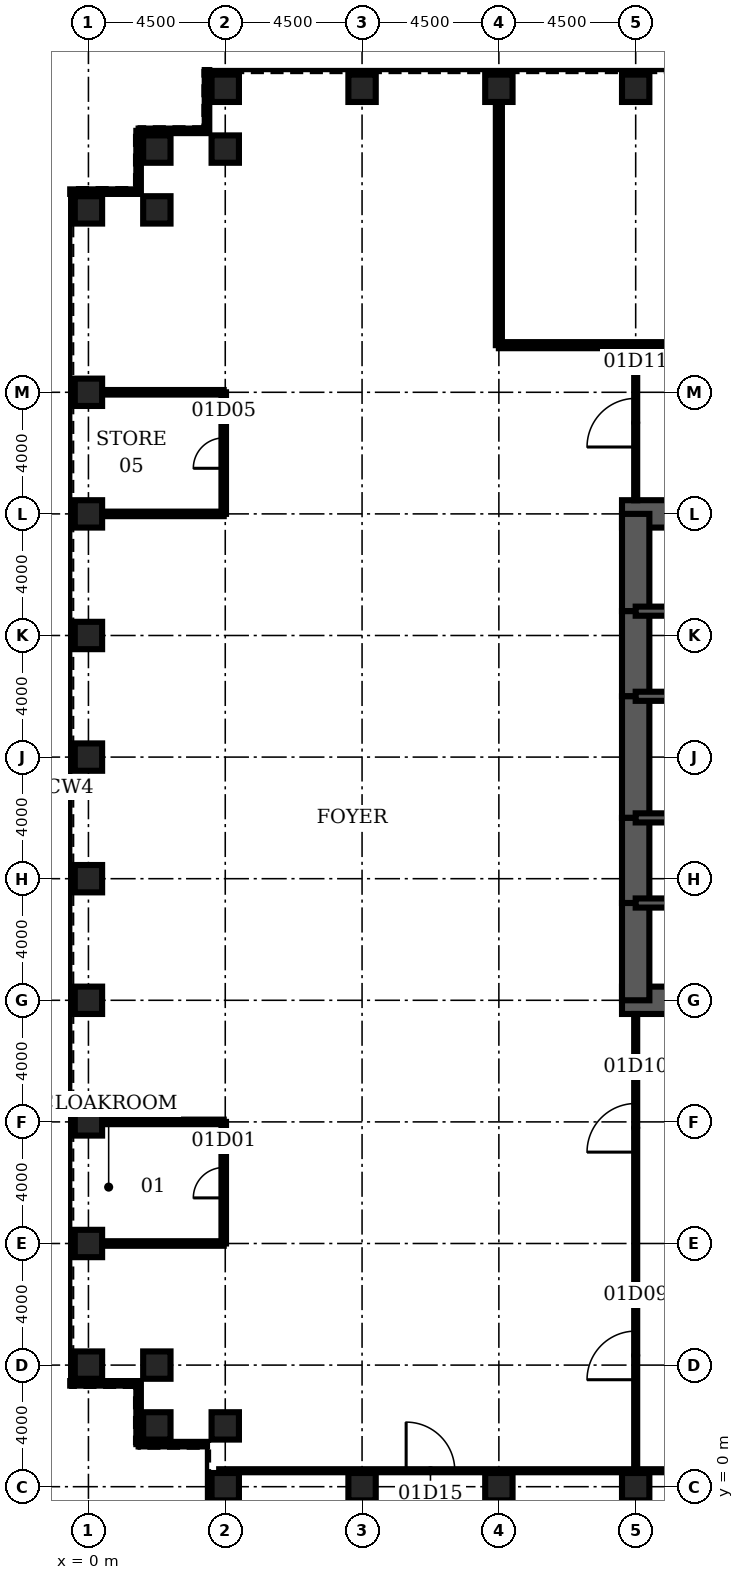
"""IFC4 building model, lengths in metres.
Left out: names, types, materials, properties, quantities, classifications, styles, units other than length and angle.
Written with IfcOpenShell. Run it as: python <this file> out.ifc"""

import sys

from ifc_helpers import new_model, si_unit, direction, frame, frame_2d, origin, origin_2d, place, context, subcontext, project, spatial, rectangle, hollow_rectangle, extrude, element, fill, save


model = new_model("IFC4")
c1 = context("Model", 3, precision=1e-05, world=origin(), true_north=direction((0.0, 1.0)))
c2 = subcontext(c1, "Body", "Model", "MODEL_VIEW")
j1 = project(units=[si_unit("LENGTHUNIT", "METRE"), si_unit("PLANEANGLEUNIT", "RADIAN")], contexts=[c1])
p1 = place(None, origin())
s1 = spatial("IfcSite", under=j1, at=p1, CompositionType="ELEMENT")
p2 = place(p1, origin())
s2 = spatial("IfcBuilding", under=s1, at=p2, CompositionType="ELEMENT")
p3 = place(p2, frame((0.0, 0.0, 6.0)))
s3 = spatial("IfcBuildingStorey", under=s2, at=p3, CompositionType="ELEMENT", Elevation=6.0)
for number, where, z_axis, x_axis in (
    (1, (4.5, 0.0, 0.0), (0.0, 0.0, 1.0), (0.0, 1.0, 0.0)),
    (2, (9.0, 0.0, 0.0), (0.0, 0.0, 1.0), (0.0, 1.0, 0.0)),
    (3, (13.5, 0.0, 0.0), (0.0, 0.0, 1.0), (0.0, 1.0, 0.0)),
    (4, (18.0, 0.0, 0.0), (0.0, 0.0, 1.0), (0.0, 1.0, 0.0)),
    (5, (18.0, 46.0, 0.0), (0.0, 0.0, 1.0), (0.0, 1.0, 0.0)),
    (6, (13.5, 46.0, 0.0), (0.0, 0.0, 1.0), (0.0, 1.0, 0.0)),
    (7, (9.0, 46.0, 0.0), (0.0, 0.0, 1.0), (0.0, 1.0, 0.0)),
    (8, (4.5, 46.0, 0.0), (0.0, 0.0, 1.0), (0.0, 1.0, 0.0)),
    (9, (4.5, 44.0, 0.0), (0.0, 0.0, 1.0), (0.0, 1.0, 0.0)),
    (10, (2.25, 44.0, 0.0), (0.0, 0.0, 1.0), (1.0, 0.0, 0.0)),
    (11, (2.25, 42.0, 0.0), (0.0, 0.0, 1.0), (1.0, 0.0, 0.0)),
    (12, (0.0, 42.0, 0.0), (0.0, 0.0, 1.0), (1.0, 0.0, 0.0)),
    (13, (0.0, 36.0, 0.0), (0.0, 0.0, 1.0), (1.0, 0.0, 0.0)),
    (14, (0.0, 32.0, 0.0), (0.0, 0.0, 1.0), (1.0, 0.0, 0.0)),
    (15, (0.0, 28.0, 0.0), (0.0, 0.0, 1.0), (1.0, 0.0, 0.0)),
    (16, (0.0, 24.0, 0.0), (0.0, 0.0, 1.0), (1.0, 0.0, 0.0)),
    (17, (0.0, 20.0, 0.0), (0.0, 0.0, 1.0), (1.0, 0.0, 0.0)),
    (18, (0.0, 16.0, 0.0), (0.0, 0.0, 1.0), (1.0, 0.0, 0.0)),
    (19, (0.0, 12.0, 0.0), (0.0, 0.0, 1.0), (1.0, 0.0, 0.0)),
    (20, (0.0, 8.0, 0.0), (0.0, 0.0, 1.0), (1.0, 0.0, 0.0)),
    (21, (0.0, 4.0, 0.0), (0.0, 0.0, 1.0), (1.0, 0.0, 0.0)),
    (22, (2.25, 4.0, 0.0), (0.0, 0.0, 1.0), (1.0, 0.0, 0.0)),
    (23, (2.25, 2.0, 0.0), (0.0, 0.0, 1.0), (1.0, 0.0, 0.0)),
    (24, (4.5, 2.0, 0.0), (0.0, 0.0, 1.0), (0.0, 1.0, 0.0)),
):
    element("IfcColumn", number, at=place(p3, frame(where, z_axis=z_axis, x_axis=x_axis)), inside=s3, PredefinedType="COLUMN", context=c2, shape_type="SweptSolid", body=[
        extrude(hollow_rectangle(XDim=0.9, YDim=0.9, WallThickness=0.12, at=origin_2d()), origin(), (0.0, 0.0, 1.0), 7.0),
    ])
for number, where, z_axis, x_axis in (
    (25, (17.55, 16.0, 0.0), (0.0, 0.0, 1.0), (1.0, 0.0, 0.0)),
    (26, (27.0, 32.0, 0.0), (0.0, 0.0, 1.0), (-1.0, 0.0, 0.0)),
):
    element("IfcWall", number, at=place(p3, frame(where, z_axis=z_axis, x_axis=x_axis)), inside=s3, PredefinedType="SHEAR", context=c2, shape_type="SweptSolid", body=[
        extrude(rectangle(XDim=9.45, YDim=0.9, at=frame_2d((4.725, 0.0))), origin(), (0.0, 0.0, 1.0), 7.0),
    ])
p4 = place(p3, frame((18.0, 32.0, 0.0), z_axis=(0.0, 0.0, 1.0), x_axis=(0.0, -1.0, 0.0)))
e27 = element("IfcWall", 27, at=p4, inside=s3, PredefinedType="SHEAR", context=c2, shape_type="SweptSolid", body=[
    extrude(rectangle(XDim=3.2, YDim=0.9, at=frame_2d((1.6, 0.0))), origin(), (0.0, 0.0, 1.0), 7.0),
])
p5 = place(p3, frame((18.0, 28.8, 0.0), z_axis=(0.0, 0.0, 1.0), x_axis=(0.0, -1.0, 0.0)))
e28 = element("IfcWall", 28, at=p5, inside=s3, PredefinedType="SHEAR", context=c2, shape_type="SweptSolid", body=[
    extrude(rectangle(XDim=2.8, YDim=0.9, at=frame_2d((1.4, 0.0))), origin(), (0.0, 0.0, 1.0), 7.0),
])
p6 = place(p5, frame((0.4, 0.0, 0.0)))
e29 = element("IfcOpeningElement", 29, at=p6, cuts=e28, PredefinedType="OPENING", context=c2, shape_type="SweptSolid", body=[
    extrude(rectangle(XDim=1.8, YDim=2.1, at=frame_2d((0.9, 1.05))), frame((0.0, 0.46, 0.0), z_axis=(0.0, -1.0, 0.0), x_axis=(1.0, 0.0, 0.0)), (0.0, 0.0, 1.0), 0.92),
])
p7 = place(p3, frame((18.0, 26.0, 0.0), z_axis=(0.0, 0.0, 1.0), x_axis=(0.0, -1.0, 0.0)))
e30 = element("IfcWall", 30, at=p7, inside=s3, PredefinedType="SHEAR", context=c2, shape_type="SweptSolid", body=[
    extrude(rectangle(XDim=4.0, YDim=0.9, at=frame_2d((2.0, 0.0))), origin(), (0.0, 0.0, 1.0), 7.0),
])
p8 = place(p3, frame((18.0, 22.0, 0.0), z_axis=(0.0, 0.0, 1.0), x_axis=(0.0, -1.0, 0.0)))
e31 = element("IfcWall", 31, at=p8, inside=s3, PredefinedType="SHEAR", context=c2, shape_type="SweptSolid", body=[
    extrude(rectangle(XDim=2.8, YDim=0.9, at=frame_2d((1.4, 0.0))), origin(), (0.0, 0.0, 1.0), 7.0),
])
p9 = place(p8, frame((0.6, 0.0, 0.0)))
e32 = element("IfcOpeningElement", 32, at=p9, cuts=e31, PredefinedType="OPENING", context=c2, shape_type="SweptSolid", body=[
    extrude(rectangle(XDim=1.8, YDim=2.1, at=frame_2d((0.9, 1.05))), frame((0.0, 0.46, 0.0), z_axis=(0.0, -1.0, 0.0), x_axis=(1.0, 0.0, 0.0)), (0.0, 0.0, 1.0), 0.92),
])
p10 = place(p3, frame((18.0, 19.2, 0.0), z_axis=(0.0, 0.0, 1.0), x_axis=(0.0, -1.0, 0.0)))
e33 = element("IfcWall", 33, at=p10, inside=s3, PredefinedType="SHEAR", context=c2, shape_type="SweptSolid", body=[
    extrude(rectangle(XDim=3.2, YDim=0.9, at=frame_2d((1.6, 0.0))), origin(), (0.0, 0.0, 1.0), 7.0),
])
p11 = place(p3, frame((18.0, 19.2, 0.0), z_axis=(0.0, 0.0, 1.0), x_axis=(1.0, 0.0, 0.0)))
e34 = element("IfcWall", 34, at=p11, inside=s3, PredefinedType="SOLIDWALL", context=c2, shape_type="SweptSolid", body=[
    extrude(rectangle(XDim=9.0, YDim=0.3, at=frame_2d((4.5, 0.0))), origin(), (0.0, 0.0, 1.0), 7.0),
])
p12 = place(p11, frame((0.65, 0.0, 0.0)))
e35 = element("IfcOpeningElement", 35, at=p12, cuts=e34, PredefinedType="OPENING", context=c2, shape_type="SweptSolid", body=[
    extrude(rectangle(XDim=1.0, YDim=2.1, at=frame_2d((0.5, 1.05))), frame((0.0, 0.16, 0.0), z_axis=(0.0, -1.0, 0.0), x_axis=(1.0, 0.0, 0.0)), (0.0, 0.0, 1.0), 0.32),
])
p13 = place(p3, frame((18.0, 28.8, 0.0), z_axis=(0.0, 0.0, 1.0), x_axis=(1.0, 0.0, 0.0)))
e36 = element("IfcWall", 36, at=p13, inside=s3, PredefinedType="SOLIDWALL", context=c2, shape_type="SweptSolid", body=[
    extrude(rectangle(XDim=9.0, YDim=0.3, at=frame_2d((4.5, 0.0))), origin(), (0.0, 0.0, 1.0), 7.0),
])
p14 = place(p13, frame((0.65, 0.0, 0.0)))
e37 = element("IfcOpeningElement", 37, at=p14, cuts=e36, PredefinedType="OPENING", context=c2, shape_type="SweptSolid", body=[
    extrude(rectangle(XDim=1.0, YDim=2.1, at=frame_2d((0.5, 1.05))), frame((0.0, 0.16, 0.0), z_axis=(0.0, -1.0, 0.0), x_axis=(1.0, 0.0, 0.0)), (0.0, 0.0, 1.0), 0.32),
])
p15 = place(p3, frame((18.0, 22.0, 0.0), z_axis=(0.0, 0.0, 1.0), x_axis=(1.0, 0.0, 0.0)))
e38 = element("IfcWall", 38, at=p15, inside=s3, PredefinedType="SOLIDWALL", context=c2, shape_type="SweptSolid", body=[
    extrude(rectangle(XDim=6.0, YDim=0.3, at=frame_2d((3.0, 0.0))), origin(), (0.0, 0.0, 1.0), 7.0),
])
p16 = place(p15, frame((4.4, 0.0, 0.0)))
e39 = element("IfcOpeningElement", 39, at=p16, cuts=e38, PredefinedType="OPENING", context=c2, shape_type="SweptSolid", body=[
    extrude(rectangle(XDim=1.0, YDim=2.1, at=frame_2d((0.5, 1.05))), frame((0.0, 0.16, 0.0), z_axis=(0.0, -1.0, 0.0), x_axis=(1.0, 0.0, 0.0)), (0.0, 0.0, 1.0), 0.32),
])
p17 = place(p15, frame((0.7, 0.0, 0.0)))
e40 = element("IfcOpeningElement", 40, at=p17, cuts=e38, PredefinedType="OPENING", context=c2, shape_type="SweptSolid", body=[
    extrude(rectangle(XDim=1.0, YDim=2.1, at=frame_2d((0.5, 1.05))), frame((0.0, 0.16, 0.0), z_axis=(0.0, -1.0, 0.0), x_axis=(1.0, 0.0, 0.0)), (0.0, 0.0, 1.0), 0.32),
])
p18 = place(p3, frame((18.0, 26.0, 0.0), z_axis=(0.0, 0.0, 1.0), x_axis=(1.0, 0.0, 0.0)))
e41 = element("IfcWall", 41, at=p18, inside=s3, PredefinedType="SOLIDWALL", context=c2, shape_type="SweptSolid", body=[
    extrude(rectangle(XDim=6.0, YDim=0.3, at=frame_2d((3.0, 0.0))), origin(), (0.0, 0.0, 1.0), 7.0),
])
for number, where, z_axis, x_axis in (
    (42, (0.45, 8.0, 0.0), (0.0, 0.0, 1.0), (1.0, 0.0, 0.0)),
    (43, (0.45, 12.0, 0.0), (0.0, 0.0, 1.0), (1.0, 0.0, 0.0)),
    (44, (0.45, 32.0, 0.0), (0.0, 0.0, 1.0), (1.0, 0.0, 0.0)),
    (45, (0.45, 36.0, 0.0), (0.0, 0.0, 1.0), (1.0, 0.0, 0.0)),
):
    element("IfcWall", number, at=place(p3, frame(where, z_axis=z_axis, x_axis=x_axis)), inside=s3, PredefinedType="PARTITIONING", context=c2, shape_type="SweptSolid", body=[
        extrude(rectangle(XDim=4.0, YDim=0.15, at=frame_2d((2.0, 0.0))), origin(), (0.0, 0.0, 1.0), 3.0),
    ])
p19 = place(p3, frame((13.5, 37.55, 0.0), z_axis=(0.0, 0.0, 1.0), x_axis=(1.0, 0.0, 0.0)))
e46 = element("IfcWall", 46, at=p19, inside=s3, PredefinedType="PARTITIONING", context=c2, shape_type="SweptSolid", body=[
    extrude(rectangle(XDim=27.0, YDim=0.2, at=frame_2d((13.5, 0.0))), origin(), (0.0, 0.0, 1.0), 3.0),
])
p20 = place(p19, frame((12.7, 0.0, 0.0)))
e47 = element("IfcOpeningElement", 47, at=p20, cuts=e46, PredefinedType="OPENING", context=c2, shape_type="SweptSolid", body=[
    extrude(rectangle(XDim=1.6, YDim=2.1, at=frame_2d((0.8, 1.05))), frame((0.0, 0.11, 0.0), z_axis=(0.0, -1.0, 0.0), x_axis=(1.0, 0.0, 0.0)), (0.0, 0.0, 1.0), 0.22),
])
p21 = place(p3, frame((4.45, 8.0, 0.0), z_axis=(0.0, 0.0, 1.0), x_axis=(0.0, 1.0, 0.0)))
e48 = element("IfcWall", 48, at=p21, inside=s3, PredefinedType="PARTITIONING", context=c2, shape_type="SweptSolid", body=[
    extrude(rectangle(XDim=4.0, YDim=0.15, at=frame_2d((2.0, 0.0))), origin(), (0.0, 0.0, 1.0), 3.0),
])
p22 = place(p21, frame((1.5, 0.0, 0.0)))
e49 = element("IfcOpeningElement", 49, at=p22, cuts=e48, PredefinedType="OPENING", context=c2, shape_type="SweptSolid", body=[
    extrude(rectangle(XDim=1.0, YDim=2.1, at=frame_2d((0.5, 1.05))), frame((0.0, 0.085, 0.0), z_axis=(0.0, -1.0, 0.0), x_axis=(1.0, 0.0, 0.0)), (0.0, 0.0, 1.0), 0.17),
])
p23 = place(p3, frame((4.45, 32.0, 0.0), z_axis=(0.0, 0.0, 1.0), x_axis=(0.0, 1.0, 0.0)))
e50 = element("IfcWall", 50, at=p23, inside=s3, PredefinedType="PARTITIONING", context=c2, shape_type="SweptSolid", body=[
    extrude(rectangle(XDim=4.0, YDim=0.15, at=frame_2d((2.0, 0.0))), origin(), (0.0, 0.0, 1.0), 3.0),
])
p24 = place(p23, frame((1.5, 0.0, 0.0)))
e51 = element("IfcOpeningElement", 51, at=p24, cuts=e50, PredefinedType="OPENING", context=c2, shape_type="SweptSolid", body=[
    extrude(rectangle(XDim=1.0, YDim=2.1, at=frame_2d((0.5, 1.05))), frame((0.0, 0.085, 0.0), z_axis=(0.0, -1.0, 0.0), x_axis=(1.0, 0.0, 0.0)), (0.0, 0.0, 1.0), 0.17),
])
p25 = place(p3, frame((13.5, 37.55, 0.0), z_axis=(0.0, 0.0, 1.0), x_axis=(0.0, 1.0, 0.0)))
e52 = element("IfcWall", 52, at=p25, inside=s3, PredefinedType="PARTITIONING", context=c2, shape_type="SweptSolid", body=[
    extrude(rectangle(XDim=8.0, YDim=0.2, at=frame_2d((4.0, 0.0))), origin(), (0.0, 0.0, 1.0), 3.0),
])
p26 = place(p3, frame((18.0, 0.575, 0.0), z_axis=(0.0, 0.0, 1.0), x_axis=(0.0, 1.0, 0.0)))
e53 = element("IfcWall", 53, at=p26, inside=s3, PredefinedType="PARTITIONING", context=c2, shape_type="SweptSolid", body=[
    extrude(rectangle(XDim=14.975, YDim=0.1, at=frame_2d((7.488, 0.0))), origin(), (0.0, 0.0, 1.0), 3.0),
])
p27 = place(p26, frame((2.944, 0.0, 0.0)))
e54 = element("IfcOpeningElement", 54, at=p27, cuts=e53, PredefinedType="OPENING", context=c2, shape_type="SweptSolid", body=[
    extrude(rectangle(XDim=1.6, YDim=2.1, at=frame_2d((0.8, 1.05))), frame((0.0, 0.06, 0.0), z_axis=(0.0, -1.0, 0.0), x_axis=(1.0, 0.0, 0.0)), (0.0, 0.0, 1.0), 0.12),
])
p28 = place(p26, frame((10.431, 0.0, 0.0)))
e55 = element("IfcOpeningElement", 55, at=p28, cuts=e53, PredefinedType="OPENING", context=c2, shape_type="SweptSolid", body=[
    extrude(rectangle(XDim=1.6, YDim=2.1, at=frame_2d((0.8, 1.05))), frame((0.0, 0.06, 0.0), z_axis=(0.0, -1.0, 0.0), x_axis=(1.0, 0.0, 0.0)), (0.0, 0.0, 1.0), 0.12),
])
p29 = place(p3, frame((18.0, 32.45, 0.0), z_axis=(0.0, 0.0, 1.0), x_axis=(0.0, 1.0, 0.0)))
e56 = element("IfcWall", 56, at=p29, inside=s3, PredefinedType="PARTITIONING", context=c2, shape_type="SweptSolid", body=[
    extrude(rectangle(XDim=5.1, YDim=0.1, at=frame_2d((2.55, 0.0))), origin(), (0.0, 0.0, 1.0), 3.0),
])
p30 = place(p29, frame((1.75, 0.0, 0.0)))
e57 = element("IfcOpeningElement", 57, at=p30, cuts=e56, PredefinedType="OPENING", context=c2, shape_type="SweptSolid", body=[
    extrude(rectangle(XDim=1.6, YDim=2.1, at=frame_2d((0.8, 1.05))), frame((0.0, 0.06, 0.0), z_axis=(0.0, -1.0, 0.0), x_axis=(1.0, 0.0, 0.0)), (0.0, 0.0, 1.0), 0.12),
])
p31 = place(p3, frame((4.3, 0.525, 0.0), z_axis=(0.0, 0.0, 1.0), x_axis=(1.0, 0.0, 0.0)))
e58 = element("IfcWall", 58, at=p31, inside=s3, PredefinedType="PARTITIONING", context=c2, shape_type="SweptSolid", body=[
    extrude(rectangle(XDim=18.2, YDim=0.1, at=frame_2d((9.1, 0.0))), origin(), (0.0, 0.0, 1.0), 3.0),
])
p32 = place(p31, frame((6.15, 0.0, 0.0)))
e59 = element("IfcOpeningElement", 59, at=p32, cuts=e58, PredefinedType="OPENING", context=c2, shape_type="SweptSolid", body=[
    extrude(rectangle(XDim=1.6, YDim=2.1, at=frame_2d((0.8, 1.05))), frame((0.0, 0.06, 0.0), z_axis=(0.0, -1.0, 0.0), x_axis=(1.0, 0.0, 0.0)), (0.0, 0.0, 1.0), 0.12),
])
p33 = place(p3, frame((3.9, 46.6, 0.0), z_axis=(0.0, 0.0, 1.0), x_axis=(0.0, -1.0, 0.0)))
e60 = element("IfcWall", 60, at=p33, inside=s3, PredefinedType="ELEMENTEDWALL", context=c2, shape_type="SweptSolid", body=[
    extrude(rectangle(XDim=2.0, YDim=0.15, at=frame_2d((1.0, 0.0))), origin(), (0.0, 0.0, 1.0), 6.82),
])
p34 = place(p3, frame((3.9, 44.6, 0.0), z_axis=(0.0, 0.0, 1.0), x_axis=(-1.0, 0.0, 0.0)))
e61 = element("IfcWall", 61, at=p34, inside=s3, PredefinedType="ELEMENTEDWALL", context=c2, shape_type="SweptSolid", body=[
    extrude(rectangle(XDim=2.25, YDim=0.15, at=frame_2d((1.125, 0.0))), origin(), (0.0, 0.0, 1.0), 6.82),
])
p35 = place(p3, frame((1.65, 44.6, 0.0), z_axis=(0.0, 0.0, 1.0), x_axis=(0.0, -1.0, 0.0)))
e62 = element("IfcWall", 62, at=p35, inside=s3, PredefinedType="ELEMENTEDWALL", context=c2, shape_type="SweptSolid", body=[
    extrude(rectangle(XDim=2.0, YDim=0.15, at=frame_2d((1.0, 0.0))), origin(), (0.0, 0.0, 1.0), 6.82),
])
for number, where, z_axis, x_axis in (
    (63, (1.65, 42.6, 0.0), (0.0, 0.0, 1.0), (-1.0, 0.0, 0.0)),
    (64, (-0.6, 3.4, 0.0), (0.0, 0.0, 1.0), (1.0, 0.0, 0.0)),
):
    element("IfcWall", number, at=place(p3, frame(where, z_axis=z_axis, x_axis=x_axis)), inside=s3, PredefinedType="ELEMENTEDWALL", context=c2, shape_type="SweptSolid", body=[
        extrude(rectangle(XDim=2.25, YDim=0.15, at=frame_2d((1.125, 0.0))), origin(), (0.0, 0.0, 1.0), 6.82),
    ])
p36 = place(p3, frame((1.65, 3.4, 0.0), z_axis=(0.0, 0.0, 1.0), x_axis=(0.0, -1.0, 0.0)))
e65 = element("IfcWall", 65, at=p36, inside=s3, PredefinedType="ELEMENTEDWALL", context=c2, shape_type="SweptSolid", body=[
    extrude(rectangle(XDim=2.0, YDim=0.15, at=frame_2d((1.0, 0.0))), origin(), (0.0, 0.0, 1.0), 6.82),
])
p37 = place(p3, frame((1.65, 1.4, 0.0), z_axis=(0.0, 0.0, 1.0), x_axis=(1.0, 0.0, 0.0)))
e66 = element("IfcWall", 66, at=p37, inside=s3, PredefinedType="ELEMENTEDWALL", context=c2, shape_type="SweptSolid", body=[
    extrude(rectangle(XDim=2.25, YDim=0.15, at=frame_2d((1.125, 0.0))), origin(), (0.0, 0.0, 1.0), 6.82),
])
p38 = place(p22, origin())
e67 = element("IfcDoor", 67, at=p38, inside=s3, OperationType="SINGLE_SWING_LEFT", PredefinedType="DOOR", context=c2, shape_type="SweptSolid", body=[
    extrude(rectangle(XDim=1.0, YDim=2.1, at=frame_2d((0.5, 1.05))), frame((0.0, 0.025, 0.0), z_axis=(0.0, -1.0, 0.0), x_axis=(1.0, 0.0, 0.0)), (0.0, 0.0, 1.0), 0.05),
])
fill(e49, e67)
p39 = place(p24, origin())
e68 = element("IfcDoor", 68, at=p39, inside=s3, OperationType="SINGLE_SWING_LEFT", PredefinedType="DOOR", context=c2, shape_type="SweptSolid", body=[
    extrude(rectangle(XDim=1.0, YDim=2.1, at=frame_2d((0.5, 1.05))), frame((0.0, 0.025, 0.0), z_axis=(0.0, -1.0, 0.0), x_axis=(1.0, 0.0, 0.0)), (0.0, 0.0, 1.0), 0.05),
])
fill(e51, e68)
p40 = place(p27, origin())
e69 = element("IfcDoor", 69, at=p40, inside=s3, OperationType="SINGLE_SWING_LEFT", PredefinedType="DOOR", context=c2, shape_type="SweptSolid", body=[
    extrude(rectangle(XDim=1.6, YDim=2.1, at=frame_2d((0.8, 1.05))), frame((0.0, 0.025, 0.0), z_axis=(0.0, -1.0, 0.0), x_axis=(1.0, 0.0, 0.0)), (0.0, 0.0, 1.0), 0.05),
])
fill(e54, e69)
p41 = place(p28, origin())
e70 = element("IfcDoor", 70, at=p41, inside=s3, OperationType="SINGLE_SWING_LEFT", PredefinedType="DOOR", context=c2, shape_type="SweptSolid", body=[
    extrude(rectangle(XDim=1.6, YDim=2.1, at=frame_2d((0.8, 1.05))), frame((0.0, 0.025, 0.0), z_axis=(0.0, -1.0, 0.0), x_axis=(1.0, 0.0, 0.0)), (0.0, 0.0, 1.0), 0.05),
])
fill(e55, e70)
p42 = place(p30, origin())
e71 = element("IfcDoor", 71, at=p42, inside=s3, OperationType="SINGLE_SWING_LEFT", PredefinedType="DOOR", context=c2, shape_type="SweptSolid", body=[
    extrude(rectangle(XDim=1.6, YDim=2.1, at=frame_2d((0.8, 1.05))), frame((0.0, 0.025, 0.0), z_axis=(0.0, -1.0, 0.0), x_axis=(1.0, 0.0, 0.0)), (0.0, 0.0, 1.0), 0.05),
])
fill(e57, e71)
p43 = place(p32, origin())
e72 = element("IfcDoor", 72, at=p43, inside=s3, OperationType="SINGLE_SWING_LEFT", PredefinedType="DOOR", context=c2, shape_type="SweptSolid", body=[
    extrude(rectangle(XDim=1.6, YDim=2.1, at=frame_2d((0.8, 1.05))), frame((0.0, 0.025, 0.0), z_axis=(0.0, -1.0, 0.0), x_axis=(1.0, 0.0, 0.0)), (0.0, 0.0, 1.0), 0.05),
])
fill(e59, e72)
p44 = place(p12, origin())
e73 = element("IfcDoor", 73, at=p44, inside=s3, OperationType="SINGLE_SWING_LEFT", PredefinedType="DOOR", context=c2, shape_type="SweptSolid", body=[
    extrude(rectangle(XDim=1.0, YDim=2.1, at=frame_2d((0.5, 1.05))), frame((0.0, 0.025, 0.0), z_axis=(0.0, -1.0, 0.0), x_axis=(1.0, 0.0, 0.0)), (0.0, 0.0, 1.0), 0.05),
])
fill(e35, e73)
p45 = place(p14, origin())
e74 = element("IfcDoor", 74, at=p45, inside=s3, OperationType="SINGLE_SWING_LEFT", PredefinedType="DOOR", context=c2, shape_type="SweptSolid", body=[
    extrude(rectangle(XDim=1.0, YDim=2.1, at=frame_2d((0.5, 1.05))), frame((0.0, 0.025, 0.0), z_axis=(0.0, -1.0, 0.0), x_axis=(1.0, 0.0, 0.0)), (0.0, 0.0, 1.0), 0.05),
])
fill(e37, e74)
p46 = place(p9, origin())
e75 = element("IfcDoor", 75, at=p46, inside=s3, OperationType="SINGLE_SWING_LEFT", PredefinedType="DOOR", context=c2, shape_type="SweptSolid", body=[
    extrude(rectangle(XDim=1.8, YDim=2.1, at=frame_2d((0.9, 1.05))), frame((0.0, 0.45, 0.0), z_axis=(0.0, -1.0, 0.0), x_axis=(1.0, 0.0, 0.0)), (0.0, 0.0, 1.0), 0.899),
])
fill(e32, e75)
p47 = place(p6, origin())
e76 = element("IfcDoor", 76, at=p47, inside=s3, OperationType="SINGLE_SWING_LEFT", PredefinedType="DOOR", context=c2, shape_type="SweptSolid", body=[
    extrude(rectangle(XDim=1.8, YDim=2.1, at=frame_2d((0.9, 1.05))), frame((0.0, 0.45, 0.0), z_axis=(0.0, -1.0, 0.0), x_axis=(1.0, 0.0, 0.0)), (0.0, 0.0, 1.0), 0.899),
])
fill(e29, e76)
p48 = place(p17, origin())
e77 = element("IfcDoor", 77, at=p48, inside=s3, OperationType="SINGLE_SWING_LEFT", PredefinedType="DOOR", context=c2, shape_type="SweptSolid", body=[
    extrude(rectangle(XDim=1.0, YDim=2.1, at=frame_2d((0.5, 1.05))), frame((0.0, 0.025, 0.0), z_axis=(0.0, -1.0, 0.0), x_axis=(1.0, 0.0, 0.0)), (0.0, 0.0, 1.0), 0.05),
])
fill(e40, e77)
save(model, sys.argv[1])
